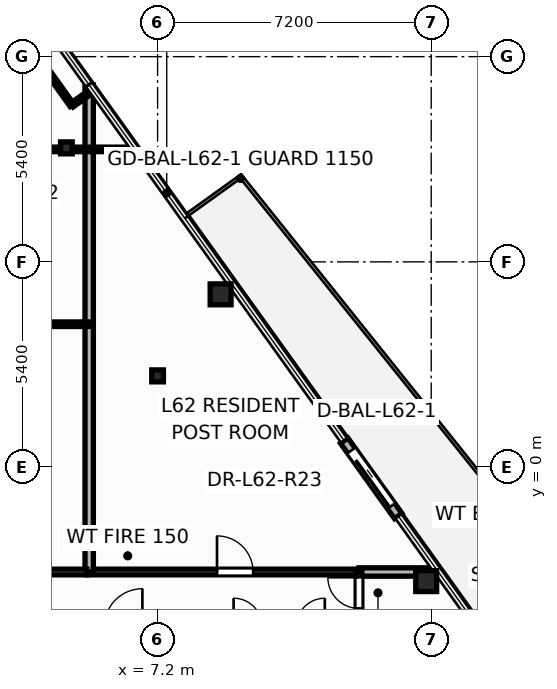
"""IFC4 building model, lengths in metres.
Left out: names, types, materials, properties, quantities, classifications, styles, units other than length and angle.
Written with IfcOpenShell. Run it as: python <this file> out.ifc"""

import sys

from ifc_helpers import new_model, si_unit, direction, frame, frame_2d, origin, origin_2d, place, context, subcontext, project, spatial, rectangle, hollow_circle, i_section, extrude, element, fill, save


model = new_model("IFC4")
c1 = context("Model", 3, precision=1e-05, world=origin(), true_north=direction((0.0, 1.0)))
c2 = subcontext(c1, "Body", "Model", "MODEL_VIEW")
j1 = project(units=[si_unit("LENGTHUNIT", "METRE"), si_unit("PLANEANGLEUNIT", "RADIAN")], contexts=[c1])
p1 = place(None, origin())
s1 = spatial("IfcSite", under=j1, at=p1, CompositionType="ELEMENT")
p2 = place(p1, origin())
s2 = spatial("IfcBuilding", under=s1, at=p2, CompositionType="ELEMENT")
p3 = place(p2, frame((0.0, 0.0, 237.0)))
s3 = spatial("IfcBuildingStorey", under=s2, at=p3, CompositionType="ELEMENT", Elevation=237.0)
for number, where, z_axis, x_axis in (
    (1, (14.268, -2.999, 0.0), (0.0, 0.0, 1.0), (1.0, 0.0, 0.0)),
    (2, (8.858, 4.546, 0.0), (0.0, 0.0, 1.0), (1.0, 0.0, 0.0)),
):
    element("IfcColumn", number, at=place(p3, frame(where, z_axis=z_axis, x_axis=x_axis)), inside=s3, PredefinedType="COLUMN", context=c2, shape_type="SweptSolid", body=[
        extrude(hollow_circle(Radius=0.275, WallThickness=0.024, at=origin_2d()), origin(), (0.0, 0.0, 1.0), 3.6),
    ])
for number, where, z_axis, x_axis in (
    (3, (7.2, 2.4, 0.0), (0.0, 0.0, 1.0), (1.0, 0.0, 0.0)),
    (4, (4.8, 8.4, 0.0), (0.0, 0.0, 1.0), (1.0, 0.0, 0.0)),
):
    element("IfcColumn", number, at=place(p3, frame(where, z_axis=z_axis, x_axis=x_axis)), inside=s3, PredefinedType="COLUMN", context=c2, shape_type="SweptSolid", body=[
        extrude(i_section(OverallWidth=0.307, OverallDepth=0.314, WebThickness=0.012, FlangeThickness=0.019, at=origin_2d()), origin(), (0.0, 0.0, 1.0), 3.6),
    ])
p4 = place(p3, frame((13.532, -1.287, -0.015), z_axis=(0.0, 0.0, 1.0), x_axis=(-0.582666574714, 0.812711303423, 0.0)))
e5 = element("IfcWall", 5, at=p4, inside=s3, PredefinedType="STANDARD", context=c2, shape_type="SweptSolid", body=[
    extrude(rectangle(XDim=2.44, YDim=0.24, at=frame_2d((1.22, 0.0))), origin(), (0.0, 0.0, 1.0), 2.878),
])
p5 = place(p4, frame((0.32, 0.0, 0.015)))
e6 = element("IfcOpeningElement", 6, at=p5, cuts=e5, PredefinedType="OPENING", context=c2, shape_type="SweptSolid", body=[
    extrude(rectangle(XDim=1.806, YDim=2.204, at=frame_2d((0.9, 1.102))), frame((0.0, 0.13, 0.0), z_axis=(0.0, -1.0, 0.0), x_axis=(1.0, 0.0, 0.0)), (0.0, 0.0, 1.0), 0.26),
])
p6 = place(p3, frame((5.34, -2.76, 0.0), z_axis=(0.0, 0.0, 1.0), x_axis=(1.0, 0.0, 0.0)))
e7 = element("IfcWall", 7, at=p6, inside=s3, PredefinedType="PARTITIONING", context=c2, shape_type="SweptSolid", body=[
    extrude(rectangle(XDim=7.16, YDim=0.15, at=frame_2d((3.58, 0.0))), origin(), (0.0, 0.0, 1.0), 2.32),
])
p7 = place(p6, frame((3.423, 0.0, 0.0)))
e8 = element("IfcOpeningElement", 8, at=p7, cuts=e7, PredefinedType="OPENING", context=c2, shape_type="SweptSolid", body=[
    extrude(rectangle(XDim=0.956, YDim=2.104, at=frame_2d((0.475, 1.052))), frame((0.0, 0.085, 0.0), z_axis=(0.0, -1.0, 0.0), x_axis=(1.0, 0.0, 0.0)), (0.0, 0.0, 1.0), 0.17),
])
p8 = place(p3, frame((5.4, -2.76, 0.0), z_axis=(0.0, 0.0, 1.0), x_axis=(0.0, 1.0, 0.0)))
e9 = element("IfcWall", 9, at=p8, inside=s3, PredefinedType="PARTITIONING", context=c2, shape_type="SweptSolid", body=[
    extrude(rectangle(XDim=12.816, YDim=0.22, at=frame_2d((6.408, 0.0))), origin(), (0.0, 0.0, 1.0), 2.32),
])
p9 = place(p3, frame((1.38, 8.36, 0.0), z_axis=(0.0, 0.0, 1.0), x_axis=(1.0, 0.0, 0.0)))
e10 = element("IfcWall", 10, at=p9, inside=s3, PredefinedType="PARTITIONING", context=c2, shape_type="SweptSolid", body=[
    extrude(rectangle(XDim=5.236, YDim=0.12, at=frame_2d((2.618, 0.0))), origin(), (0.0, 0.0, 1.0), 2.62),
])
p10 = place(p9, frame((0.557, 0.0, 0.0)))
e11 = element("IfcOpeningElement", 11, at=p10, cuts=e10, PredefinedType="OPENING", context=c2, shape_type="SweptSolid", body=[
    extrude(rectangle(XDim=0.926, YDim=2.104, at=frame_2d((0.46, 1.052))), frame((0.0, 0.07, 0.0), z_axis=(0.0, -1.0, 0.0), x_axis=(1.0, 0.0, 0.0)), (0.0, 0.0, 1.0), 0.14),
])
p11 = place(p3, frame((0.24, -2.76, 0.0), z_axis=(0.0, 0.0, 1.0), x_axis=(1.0, 0.0, 0.0)))
e12 = element("IfcWall", 12, at=p11, inside=s3, PredefinedType="PARTITIONING", context=c2, shape_type="SweptSolid", body=[
    extrude(rectangle(XDim=5.098, YDim=0.15, at=frame_2d((2.549, 0.0))), origin(), (0.0, 0.0, 1.0), 2.964),
])
p12 = place(p11, frame((1.317, 0.0, 0.0)))
e13 = element("IfcOpeningElement", 13, at=p12, cuts=e12, PredefinedType="OPENING", context=c2, shape_type="SweptSolid", body=[
    extrude(rectangle(XDim=0.956, YDim=2.104, at=frame_2d((0.475, 1.052))), frame((0.0, 0.085, 0.0), z_axis=(0.0, -1.0, 0.0), x_axis=(1.0, 0.0, 0.0)), (0.0, 0.0, 1.0), 0.17),
])
p13 = place(p3, frame((1.32, 3.76, 0.0), z_axis=(0.0, 0.0, 1.0), x_axis=(1.0, 0.0, 0.0)))
e14 = element("IfcWall", 14, at=p13, inside=s3, PredefinedType="PARTITIONING", context=c2, shape_type="SweptSolid", body=[
    extrude(rectangle(XDim=4.08, YDim=0.12, at=frame_2d((2.04, 0.0))), origin(), (0.0, 0.0, 1.0), 2.964),
])
p14 = place(p13, frame((0.396, 0.0, 0.0)))
e15 = element("IfcOpeningElement", 15, at=p14, cuts=e14, PredefinedType="OPENING", context=c2, shape_type="SweptSolid", body=[
    extrude(rectangle(XDim=0.926, YDim=2.104, at=frame_2d((0.46, 1.052))), frame((0.0, 0.07, 0.0), z_axis=(0.0, -1.0, 0.0), x_axis=(1.0, 0.0, 0.0)), (0.0, 0.0, 1.0), 0.14),
])
p15 = place(p3, frame((4.945, 9.525, 0.0), z_axis=(0.0, 0.0, 1.0), x_axis=(-0.58269400411, 0.812691637446, 0.0)))
e16 = element("IfcWall", 16, at=p15, inside=s3, PredefinedType="PARTITIONING", context=c2, shape_type="SweptSolid", body=[
    extrude(rectangle(XDim=2.441, YDim=0.12, at=frame_2d((1.221, 0.0))), origin(), (0.0, 0.0, 1.0), 2.62),
])
p16 = place(p3, frame((12.5, -2.76, 0.0), z_axis=(0.0, 0.0, 1.0), x_axis=(1.0, 0.0, 0.0)))
e17 = element("IfcWall", 17, at=p16, inside=s3, PredefinedType="PARTITIONING", context=c2, shape_type="SweptSolid", body=[
    extrude(rectangle(XDim=2.088, YDim=0.22, at=frame_2d((1.044, 0.0))), origin(), (0.0, 0.0, 1.0), 2.62),
])
p17 = place(p3, frame((12.5, -4.24, 0.0), z_axis=(0.0, 0.0, 1.0), x_axis=(0.0, 1.0, 0.0)))
e18 = element("IfcWall", 18, at=p17, inside=s3, PredefinedType="PARTITIONING", context=c2, shape_type="SweptSolid", body=[
    extrude(rectangle(XDim=1.48, YDim=0.15, at=frame_2d((0.74, 0.0))), origin(), (0.0, 0.0, 1.0), 2.32),
])
p18 = place(p17, frame((0.522, 0.0, 0.0)))
e19 = element("IfcOpeningElement", 19, at=p18, cuts=e18, PredefinedType="OPENING", context=c2, shape_type="SweptSolid", body=[
    extrude(rectangle(XDim=0.826, YDim=2.104, at=frame_2d((0.41, 1.052))), frame((0.0, 0.085, 0.0), z_axis=(0.0, -1.0, 0.0), x_axis=(1.0, 0.0, 0.0)), (0.0, 0.0, 1.0), 0.17),
])
p19 = place(p3, frame((5.489, 9.915, 0.0), z_axis=(0.0, 0.0, 1.0), x_axis=(-0.812673311452, -0.582719562786, 0.0)))
e20 = element("IfcWall", 20, at=p19, inside=s3, PredefinedType="PARTITIONING", context=c2, shape_type="SweptSolid", body=[
    extrude(rectangle(XDim=0.67, YDim=0.12, at=frame_2d((0.335, 0.0))), origin(), (0.0, 0.0, 1.0), 2.863),
])
p20 = place(p5, origin())
e21 = element("IfcDoor", 21, at=p20, inside=s3, OperationType="SLIDING_TO_LEFT", PredefinedType="DOOR", context=c2, shape_type="SweptSolid", body=[
    extrude(rectangle(XDim=1.8, YDim=2.2, at=frame_2d((0.9, 1.1))), frame((0.0, 0.025, 0.0), z_axis=(0.0, -1.0, 0.0), x_axis=(1.0, 0.0, 0.0)), (0.0, 0.0, 1.0), 0.05),
])
fill(e6, e21)
p21 = place(p18, origin())
e22 = element("IfcDoor", 22, at=p21, inside=s3, OperationType="SINGLE_SWING_RIGHT", PredefinedType="DOOR", context=c2, shape_type="SweptSolid", body=[
    extrude(rectangle(XDim=0.82, YDim=2.1, at=frame_2d((0.41, 1.05))), frame((0.0, 0.025, 0.0), z_axis=(0.0, -1.0, 0.0), x_axis=(1.0, 0.0, 0.0)), (0.0, 0.0, 1.0), 0.05),
])
fill(e19, e22)
p22 = place(p7, origin())
e23 = element("IfcDoor", 23, at=p22, inside=s3, OperationType="SINGLE_SWING_LEFT", PredefinedType="DOOR", context=c2, shape_type="SweptSolid", body=[
    extrude(rectangle(XDim=0.95, YDim=2.1, at=frame_2d((0.475, 1.05))), frame((0.0, 0.025, 0.0), z_axis=(0.0, -1.0, 0.0), x_axis=(1.0, 0.0, 0.0)), (0.0, 0.0, 1.0), 0.05),
])
fill(e8, e23)
save(model, sys.argv[1])
